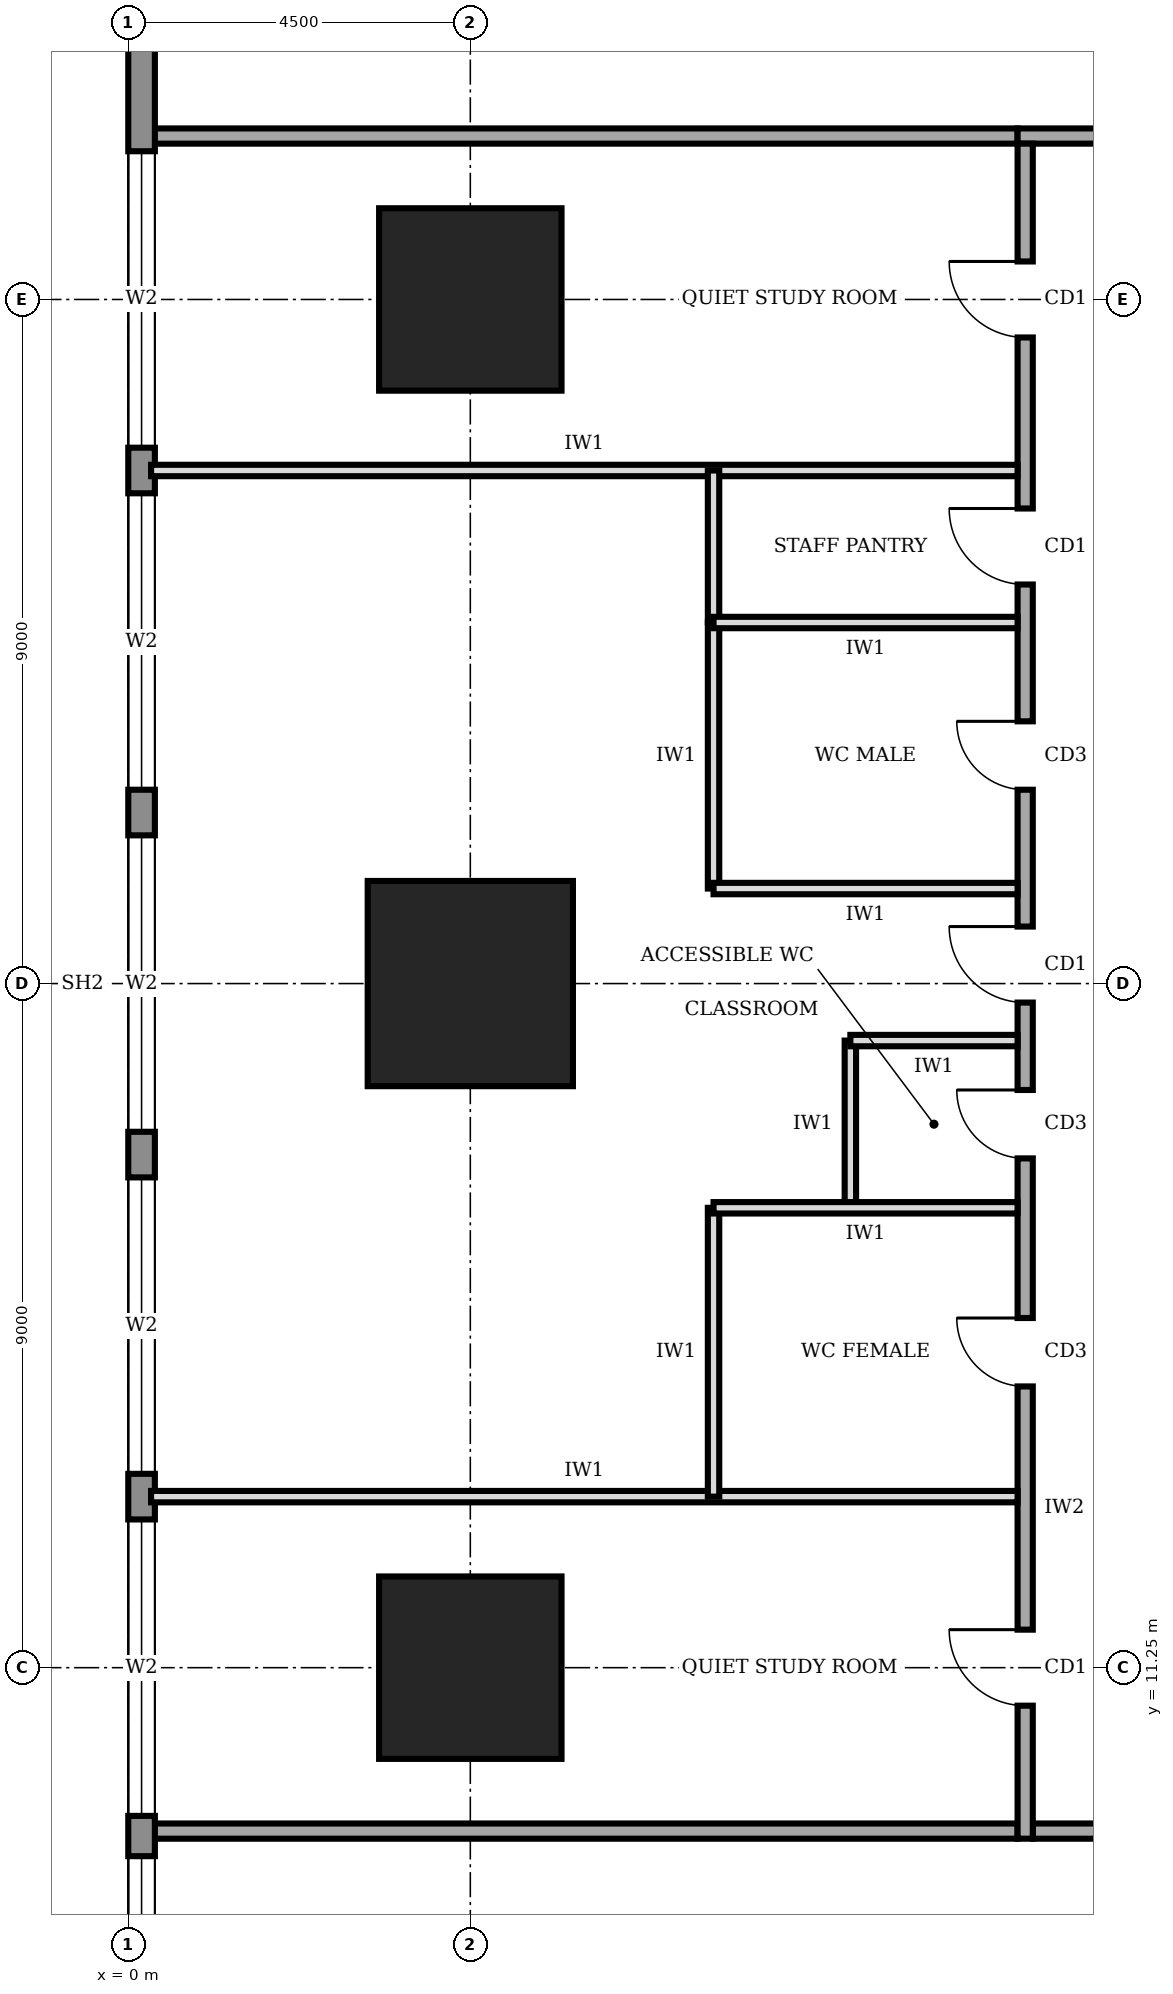
"""IFC4 building model, lengths in metres.
Left out: names, types, materials, properties, quantities, classifications, styles, units other than length and angle.
Written with IfcOpenShell. Run it as: python <this file> out.ifc"""

import sys

from ifc_helpers import new_model, si_unit, direction, frame, frame_2d, origin, origin_2d, place, context, subcontext, project, spatial, rectangle, extrude, element, fill, save


model = new_model("IFC4")
c1 = context("Model", 3, precision=1e-05, world=origin(), true_north=direction((0.0, 1.0)))
c2 = subcontext(c1, "Body", "Model", "MODEL_VIEW")
j1 = project(units=[si_unit("LENGTHUNIT", "METRE"), si_unit("PLANEANGLEUNIT", "RADIAN")], contexts=[c1])
p1 = place(None, origin())
s1 = spatial("IfcSite", under=j1, at=p1, CompositionType="ELEMENT")
p2 = place(p1, origin())
s2 = spatial("IfcBuilding", under=s1, at=p2, CompositionType="ELEMENT")
p3 = place(p2, frame((0.0, 0.0, 65.0)))
s3 = spatial("IfcBuildingStorey", under=s2, at=p3, CompositionType="ELEMENT", Elevation=65.0)
p4 = place(p3, frame((4.5, 11.25, 0.0), z_axis=(0.0, 0.0, 1.0), x_axis=(1.0, 0.0, 0.0)))
e1 = element("IfcColumn", 1, at=p4, inside=s3, PredefinedType="COLUMN", context=c2, shape_type="SweptSolid", body=[
    extrude(rectangle(XDim=2.4, YDim=2.4, at=origin_2d()), origin(), (0.0, 0.0, 1.0), 4.0),
])
p5 = place(p3, frame((4.5, 20.25, 0.0), z_axis=(0.0, 0.0, 1.0), x_axis=(1.0, 0.0, 0.0)))
e2 = element("IfcColumn", 2, at=p5, inside=s3, PredefinedType="COLUMN", context=c2, shape_type="SweptSolid", body=[
    extrude(rectangle(XDim=2.7, YDim=2.7, at=origin_2d()), origin(), (0.0, 0.0, 1.0), 4.0),
])
p6 = place(p3, frame((4.5, 29.25, 0.0), z_axis=(0.0, 0.0, 1.0), x_axis=(1.0, 0.0, 0.0)))
e3 = element("IfcColumn", 3, at=p6, inside=s3, PredefinedType="COLUMN", context=c2, shape_type="SweptSolid", body=[
    extrude(rectangle(XDim=2.4, YDim=2.4, at=origin_2d()), origin(), (0.0, 0.0, 1.0), 4.0),
])
p7 = place(p3, frame((0.175, 35.98, 0.0), z_axis=(0.0, 0.0, 1.0), x_axis=(0.0, -1.0, 0.0)))
e4 = element("IfcWall", 4, at=p7, inside=s3, PredefinedType="STANDARD", context=c2, shape_type="SweptSolid", body=[
    extrude(rectangle(XDim=31.46, YDim=0.35, at=frame_2d((15.73, 0.0))), origin(), (0.0, 0.0, 1.0), 3.75),
])
p8 = place(p7, frame((27.21, 0.0, 0.6)))
e5 = element("IfcOpeningElement", 5, at=p8, cuts=e4, PredefinedType="OPENING", context=c2, shape_type="SweptSolid", body=[
    extrude(rectangle(XDim=3.9, YDim=2.6, at=frame_2d((1.95, 1.3))), frame((0.0, 0.185, 0.0), z_axis=(0.0, -1.0, 0.0), x_axis=(1.0, 0.0, 0.0)), (0.0, 0.0, 1.0), 0.37),
])
p9 = place(p7, frame((22.78, 0.0, 0.6)))
e6 = element("IfcOpeningElement", 6, at=p9, cuts=e4, PredefinedType="OPENING", context=c2, shape_type="SweptSolid", body=[
    extrude(rectangle(XDim=3.9, YDim=2.6, at=frame_2d((1.95, 1.3))), frame((0.0, 0.185, 0.0), z_axis=(0.0, -1.0, 0.0), x_axis=(1.0, 0.0, 0.0)), (0.0, 0.0, 1.0), 0.37),
])
p10 = place(p7, frame((18.28, 0.0, 0.6)))
e7 = element("IfcOpeningElement", 7, at=p10, cuts=e4, PredefinedType="OPENING", context=c2, shape_type="SweptSolid", body=[
    extrude(rectangle(XDim=3.9, YDim=2.6, at=frame_2d((1.95, 1.3))), frame((0.0, 0.185, 0.0), z_axis=(0.0, -1.0, 0.0), x_axis=(1.0, 0.0, 0.0)), (0.0, 0.0, 1.0), 0.37),
])
p11 = place(p7, frame((13.78, 0.0, 0.6)))
e8 = element("IfcOpeningElement", 8, at=p11, cuts=e4, PredefinedType="OPENING", context=c2, shape_type="SweptSolid", body=[
    extrude(rectangle(XDim=3.9, YDim=2.6, at=frame_2d((1.95, 1.3))), frame((0.0, 0.185, 0.0), z_axis=(0.0, -1.0, 0.0), x_axis=(1.0, 0.0, 0.0)), (0.0, 0.0, 1.0), 0.37),
])
p12 = place(p7, frame((9.28, 0.0, 0.6)))
e9 = element("IfcOpeningElement", 9, at=p12, cuts=e4, PredefinedType="OPENING", context=c2, shape_type="SweptSolid", body=[
    extrude(rectangle(XDim=3.9, YDim=2.6, at=frame_2d((1.95, 1.3))), frame((0.0, 0.185, 0.0), z_axis=(0.0, -1.0, 0.0), x_axis=(1.0, 0.0, 0.0)), (0.0, 0.0, 1.0), 0.37),
])
p13 = place(p7, frame((4.78, 0.0, 0.6)))
e10 = element("IfcOpeningElement", 10, at=p13, cuts=e4, PredefinedType="OPENING", context=c2, shape_type="SweptSolid", body=[
    extrude(rectangle(XDim=3.9, YDim=2.6, at=frame_2d((1.95, 1.3))), frame((0.0, 0.185, 0.0), z_axis=(0.0, -1.0, 0.0), x_axis=(1.0, 0.0, 0.0)), (0.0, 0.0, 1.0), 0.37),
])
p14 = place(p3, frame((11.9, 9.1, 0.0), z_axis=(0.0, 0.0, 1.0), x_axis=(1.0, 0.0, 0.0)))
e11 = element("IfcWall", 11, at=p14, inside=s3, PredefinedType="SOLIDWALL", context=c2, shape_type="SweptSolid", body=[
    extrude(rectangle(XDim=18.4, YDim=0.2, at=frame_2d((9.2, 0.0))), origin(), (0.0, 0.0, 1.0), 3.75),
])
p15 = place(p14, frame((2.25, 0.0, 0.0)))
e12 = element("IfcOpeningElement", 12, at=p15, cuts=e11, PredefinedType="OPENING", context=c2, shape_type="SweptSolid", body=[
    extrude(rectangle(XDim=1.4, YDim=2.1, at=frame_2d((0.7, 1.05))), frame((0.0, 0.11, 0.0), z_axis=(0.0, -1.0, 0.0), x_axis=(1.0, 0.0, 0.0)), (0.0, 0.0, 1.0), 0.22),
])
p16 = place(p14, frame((7.85, 0.0, 0.0)))
e13 = element("IfcOpeningElement", 13, at=p16, cuts=e11, PredefinedType="OPENING", context=c2, shape_type="SweptSolid", body=[
    extrude(rectangle(XDim=1.0, YDim=2.1, at=frame_2d((0.5, 1.05))), frame((0.0, 0.11, 0.0), z_axis=(0.0, -1.0, 0.0), x_axis=(1.0, 0.0, 0.0)), (0.0, 0.0, 1.0), 0.22),
])
p17 = place(p14, frame((13.8, 0.0, 0.0)))
e14 = element("IfcOpeningElement", 14, at=p17, cuts=e11, PredefinedType="OPENING", context=c2, shape_type="SweptSolid", body=[
    extrude(rectangle(XDim=1.4, YDim=2.1, at=frame_2d((0.7, 1.05))), frame((0.0, 0.11, 0.0), z_axis=(0.0, -1.0, 0.0), x_axis=(1.0, 0.0, 0.0)), (0.0, 0.0, 1.0), 0.22),
])
p18 = place(p3, frame((30.1, 31.4, 0.0), z_axis=(0.0, 0.0, 1.0), x_axis=(-1.0, 0.0, 0.0)))
e15 = element("IfcWall", 15, at=p18, inside=s3, PredefinedType="SOLIDWALL", context=c2, shape_type="SweptSolid", body=[
    extrude(rectangle(XDim=18.4, YDim=0.2, at=frame_2d((9.2, 0.0))), origin(), (0.0, 0.0, 1.0), 3.75),
])
p19 = place(p18, frame((14.55, 0.0, 0.0)))
e16 = element("IfcOpeningElement", 16, at=p19, cuts=e15, PredefinedType="OPENING", context=c2, shape_type="SweptSolid", body=[
    extrude(rectangle(XDim=1.4, YDim=2.1, at=frame_2d((0.7, 1.05))), frame((0.0, 0.11, 0.0), z_axis=(0.0, -1.0, 0.0), x_axis=(1.0, 0.0, 0.0)), (0.0, 0.0, 1.0), 0.22),
])
p20 = place(p18, frame((7.1, 0.0, 0.0)))
e17 = element("IfcOpeningElement", 17, at=p20, cuts=e15, PredefinedType="OPENING", context=c2, shape_type="SweptSolid", body=[
    extrude(rectangle(XDim=1.0, YDim=2.1, at=frame_2d((0.5, 1.05))), frame((0.0, 0.11, 0.0), z_axis=(0.0, -1.0, 0.0), x_axis=(1.0, 0.0, 0.0)), (0.0, 0.0, 1.0), 0.22),
])
p21 = place(p18, frame((0.55, 0.0, 0.0)))
e18 = element("IfcOpeningElement", 18, at=p21, cuts=e15, PredefinedType="OPENING", context=c2, shape_type="SweptSolid", body=[
    extrude(rectangle(XDim=1.8, YDim=2.1, at=frame_2d((0.9, 1.05))), frame((0.0, 0.11, 0.0), z_axis=(0.0, -1.0, 0.0), x_axis=(1.0, 0.0, 0.0)), (0.0, 0.0, 1.0), 0.22),
])
p22 = place(p3, frame((11.8, 31.3, 0.0), z_axis=(0.0, 0.0, 1.0), x_axis=(0.0, -1.0, 0.0)))
e19 = element("IfcWall", 19, at=p22, inside=s3, PredefinedType="SOLIDWALL", context=c2, shape_type="SweptSolid", body=[
    extrude(rectangle(XDim=22.3, YDim=0.2, at=frame_2d((11.15, 0.0))), origin(), (0.0, 0.0, 1.0), 3.75),
])
p23 = place(p22, frame((19.55, 0.0, 0.0)))
e20 = element("IfcOpeningElement", 20, at=p23, cuts=e19, PredefinedType="OPENING", context=c2, shape_type="SweptSolid", body=[
    extrude(rectangle(XDim=1.0, YDim=2.1, at=frame_2d((0.5, 1.05))), frame((0.0, 0.11, 0.0), z_axis=(0.0, -1.0, 0.0), x_axis=(1.0, 0.0, 0.0)), (0.0, 0.0, 1.0), 0.22),
])
p24 = place(p22, frame((15.45, 0.0, 0.0)))
e21 = element("IfcOpeningElement", 21, at=p24, cuts=e19, PredefinedType="OPENING", context=c2, shape_type="SweptSolid", body=[
    extrude(rectangle(XDim=0.9, YDim=2.1, at=frame_2d((0.45, 1.05))), frame((0.0, 0.11, 0.0), z_axis=(0.0, -1.0, 0.0), x_axis=(1.0, 0.0, 0.0)), (0.0, 0.0, 1.0), 0.22),
])
p25 = place(p22, frame((12.45, 0.0, 0.0)))
e22 = element("IfcOpeningElement", 22, at=p25, cuts=e19, PredefinedType="OPENING", context=c2, shape_type="SweptSolid", body=[
    extrude(rectangle(XDim=0.9, YDim=2.1, at=frame_2d((0.45, 1.05))), frame((0.0, 0.11, 0.0), z_axis=(0.0, -1.0, 0.0), x_axis=(1.0, 0.0, 0.0)), (0.0, 0.0, 1.0), 0.22),
])
p26 = place(p22, frame((7.6, 0.0, 0.0)))
e23 = element("IfcOpeningElement", 23, at=p26, cuts=e19, PredefinedType="OPENING", context=c2, shape_type="SweptSolid", body=[
    extrude(rectangle(XDim=0.9, YDim=2.1, at=frame_2d((0.45, 1.05))), frame((0.0, 0.11, 0.0), z_axis=(0.0, -1.0, 0.0), x_axis=(1.0, 0.0, 0.0)), (0.0, 0.0, 1.0), 0.22),
])
p27 = place(p22, frame((4.8, 0.0, 0.0)))
e24 = element("IfcOpeningElement", 24, at=p27, cuts=e19, PredefinedType="OPENING", context=c2, shape_type="SweptSolid", body=[
    extrude(rectangle(XDim=1.0, YDim=2.1, at=frame_2d((0.5, 1.05))), frame((0.0, 0.11, 0.0), z_axis=(0.0, -1.0, 0.0), x_axis=(1.0, 0.0, 0.0)), (0.0, 0.0, 1.0), 0.22),
])
p28 = place(p22, frame((10.3, 0.0, 0.0)))
e25 = element("IfcOpeningElement", 25, at=p28, cuts=e19, PredefinedType="OPENING", context=c2, shape_type="SweptSolid", body=[
    extrude(rectangle(XDim=1.0, YDim=2.1, at=frame_2d((0.5, 1.05))), frame((0.0, 0.11, 0.0), z_axis=(0.0, -1.0, 0.0), x_axis=(1.0, 0.0, 0.0)), (0.0, 0.0, 1.0), 0.22),
])
p29 = place(p22, frame((1.55, 0.0, 0.0)))
e26 = element("IfcOpeningElement", 26, at=p29, cuts=e19, PredefinedType="OPENING", context=c2, shape_type="SweptSolid", body=[
    extrude(rectangle(XDim=1.0, YDim=2.1, at=frame_2d((0.5, 1.05))), frame((0.0, 0.11, 0.0), z_axis=(0.0, -1.0, 0.0), x_axis=(1.0, 0.0, 0.0)), (0.0, 0.0, 1.0), 0.22),
])
for number, where, z_axis, x_axis in (
    (27, (0.3, 9.1, 0.0), (0.0, 0.0, 1.0), (1.0, 0.0, 0.0)),
    (28, (0.3, 31.4, 0.0), (0.0, 0.0, 1.0), (1.0, 0.0, 0.0)),
):
    element("IfcWall", number, at=place(p3, frame(where, z_axis=z_axis, x_axis=x_axis)), inside=s3, PredefinedType="SOLIDWALL", context=c2, shape_type="SweptSolid", body=[
        extrude(rectangle(XDim=11.4, YDim=0.2, at=frame_2d((5.7, 0.0))), origin(), (0.0, 0.0, 1.0), 3.75),
    ])
for number, where, z_axis, x_axis in (
    (29, (0.3, 13.5, 0.0), (0.0, 0.0, 1.0), (1.0, 0.0, 0.0)),
    (30, (0.3, 27.0, 0.0), (0.0, 0.0, 1.0), (1.0, 0.0, 0.0)),
):
    element("IfcWall", number, at=place(p3, frame(where, z_axis=z_axis, x_axis=x_axis)), inside=s3, PredefinedType="PARTITIONING", context=c2, shape_type="SweptSolid", body=[
        extrude(rectangle(XDim=11.4, YDim=0.15, at=frame_2d((5.7, 0.0))), origin(), (0.0, 0.0, 1.0), 3.75),
    ])
p30 = place(p3, frame((11.7, 17.3, 0.0), z_axis=(0.0, 0.0, 1.0), x_axis=(-1.0, 0.0, 0.0)))
e31 = element("IfcWall", 31, at=p30, inside=s3, PredefinedType="PARTITIONING", context=c2, shape_type="SweptSolid", body=[
    extrude(rectangle(XDim=4.0, YDim=0.15, at=frame_2d((2.0, 0.0))), origin(), (0.0, 0.0, 1.0), 3.75),
])
p31 = place(p3, frame((11.7, 19.5, 0.0), z_axis=(0.0, 0.0, 1.0), x_axis=(-1.0, 0.0, 0.0)))
e32 = element("IfcWall", 32, at=p31, inside=s3, PredefinedType="PARTITIONING", context=c2, shape_type="SweptSolid", body=[
    extrude(rectangle(XDim=2.2, YDim=0.15, at=frame_2d((1.1, 0.0))), origin(), (0.0, 0.0, 1.0), 2.85),
])
for number, where, z_axis, x_axis in (
    (33, (11.7, 21.5, 0.0), (0.0, 0.0, 1.0), (-1.0, 0.0, 0.0)),
    (34, (11.7, 25.0, 0.0), (0.0, 0.0, 1.0), (-1.0, 0.0, 0.0)),
):
    element("IfcWall", number, at=place(p3, frame(where, z_axis=z_axis, x_axis=x_axis)), inside=s3, PredefinedType="PARTITIONING", context=c2, shape_type="SweptSolid", body=[
        extrude(rectangle(XDim=4.0, YDim=0.15, at=frame_2d((2.0, 0.0))), origin(), (0.0, 0.0, 1.0), 3.75),
    ])
p32 = place(p3, frame((7.7, 13.5, 0.0), z_axis=(0.0, 0.0, 1.0), x_axis=(0.0, 1.0, 0.0)))
e35 = element("IfcWall", 35, at=p32, inside=s3, PredefinedType="PARTITIONING", context=c2, shape_type="SweptSolid", body=[
    extrude(rectangle(XDim=3.8, YDim=0.15, at=frame_2d((1.9, 0.0))), origin(), (0.0, 0.0, 1.0), 3.75),
])
p33 = place(p3, frame((9.5, 17.3, 0.0), z_axis=(0.0, 0.0, 1.0), x_axis=(0.0, 1.0, 0.0)))
e36 = element("IfcWall", 36, at=p33, inside=s3, PredefinedType="PARTITIONING", context=c2, shape_type="SweptSolid", body=[
    extrude(rectangle(XDim=2.2, YDim=0.15, at=frame_2d((1.1, 0.0))), origin(), (0.0, 0.0, 1.0), 3.75),
])
p34 = place(p3, frame((7.7, 21.5, 0.0), z_axis=(0.0, 0.0, 1.0), x_axis=(0.0, 1.0, 0.0)))
e37 = element("IfcWall", 37, at=p34, inside=s3, PredefinedType="PARTITIONING", context=c2, shape_type="SweptSolid", body=[
    extrude(rectangle(XDim=3.5, YDim=0.15, at=frame_2d((1.75, 0.0))), origin(), (0.0, 0.0, 1.0), 3.75),
])
p35 = place(p3, frame((7.7, 25.0, 0.0), z_axis=(0.0, 0.0, 1.0), x_axis=(0.0, 1.0, 0.0)))
e38 = element("IfcWall", 38, at=p35, inside=s3, PredefinedType="PARTITIONING", context=c2, shape_type="SweptSolid", body=[
    extrude(rectangle(XDim=2.0, YDim=0.15, at=frame_2d((1.0, 0.0))), origin(), (0.0, 0.0, 1.0), 3.75),
])
p36 = place(p8, origin())
e39 = element("IfcWindow", 39, at=p36, inside=s3, PartitioningType="SINGLE_PANEL", PredefinedType="WINDOW", context=c2, shape_type="SweptSolid", body=[
    extrude(rectangle(XDim=3.9, YDim=2.6, at=frame_2d((1.95, 1.3))), frame((0.0, 0.03, 0.0), z_axis=(0.0, -1.0, 0.0), x_axis=(1.0, 0.0, 0.0)), (0.0, 0.0, 1.0), 0.06),
])
fill(e5, e39)
p37 = place(p9, origin())
e40 = element("IfcWindow", 40, at=p37, inside=s3, PartitioningType="SINGLE_PANEL", PredefinedType="WINDOW", context=c2, shape_type="SweptSolid", body=[
    extrude(rectangle(XDim=3.9, YDim=2.6, at=frame_2d((1.95, 1.3))), frame((0.0, 0.03, 0.0), z_axis=(0.0, -1.0, 0.0), x_axis=(1.0, 0.0, 0.0)), (0.0, 0.0, 1.0), 0.06),
])
fill(e6, e40)
p38 = place(p10, origin())
e41 = element("IfcWindow", 41, at=p38, inside=s3, PartitioningType="SINGLE_PANEL", PredefinedType="WINDOW", context=c2, shape_type="SweptSolid", body=[
    extrude(rectangle(XDim=3.9, YDim=2.6, at=frame_2d((1.95, 1.3))), frame((0.0, 0.03, 0.0), z_axis=(0.0, -1.0, 0.0), x_axis=(1.0, 0.0, 0.0)), (0.0, 0.0, 1.0), 0.06),
])
fill(e7, e41)
p39 = place(p11, origin())
e42 = element("IfcWindow", 42, at=p39, inside=s3, PartitioningType="SINGLE_PANEL", PredefinedType="WINDOW", context=c2, shape_type="SweptSolid", body=[
    extrude(rectangle(XDim=3.9, YDim=2.6, at=frame_2d((1.95, 1.3))), frame((0.0, 0.03, 0.0), z_axis=(0.0, -1.0, 0.0), x_axis=(1.0, 0.0, 0.0)), (0.0, 0.0, 1.0), 0.06),
])
fill(e8, e42)
p40 = place(p12, origin())
e43 = element("IfcWindow", 43, at=p40, inside=s3, PartitioningType="SINGLE_PANEL", PredefinedType="WINDOW", context=c2, shape_type="SweptSolid", body=[
    extrude(rectangle(XDim=3.9, YDim=2.6, at=frame_2d((1.95, 1.3))), frame((0.0, 0.03, 0.0), z_axis=(0.0, -1.0, 0.0), x_axis=(1.0, 0.0, 0.0)), (0.0, 0.0, 1.0), 0.06),
])
fill(e9, e43)
p41 = place(p13, origin())
e44 = element("IfcWindow", 44, at=p41, inside=s3, PartitioningType="SINGLE_PANEL", PredefinedType="WINDOW", context=c2, shape_type="SweptSolid", body=[
    extrude(rectangle(XDim=3.9, YDim=2.6, at=frame_2d((1.95, 1.3))), frame((0.0, 0.03, 0.0), z_axis=(0.0, -1.0, 0.0), x_axis=(1.0, 0.0, 0.0)), (0.0, 0.0, 1.0), 0.06),
])
fill(e10, e44)
p42 = place(p23, frame((1.0, 0.0, 0.0), z_axis=(0.0, 0.0, 1.0), x_axis=(-1.0, 0.0, 0.0)))
e45 = element("IfcDoor", 45, at=p42, inside=s3, OperationType="SINGLE_SWING_RIGHT", PredefinedType="DOOR", context=c2, shape_type="SweptSolid", body=[
    extrude(rectangle(XDim=1.0, YDim=2.1, at=frame_2d((0.5, 1.05))), frame((0.0, 0.025, 0.0), z_axis=(0.0, -1.0, 0.0), x_axis=(1.0, 0.0, 0.0)), (0.0, 0.0, 1.0), 0.05),
])
fill(e20, e45)
p43 = place(p24, frame((0.9, 0.0, 0.0), z_axis=(0.0, 0.0, 1.0), x_axis=(-1.0, 0.0, 0.0)))
e46 = element("IfcDoor", 46, at=p43, inside=s3, OperationType="SINGLE_SWING_RIGHT", PredefinedType="DOOR", context=c2, shape_type="SweptSolid", body=[
    extrude(rectangle(XDim=0.9, YDim=2.1, at=frame_2d((0.45, 1.05))), frame((0.0, 0.025, 0.0), z_axis=(0.0, -1.0, 0.0), x_axis=(1.0, 0.0, 0.0)), (0.0, 0.0, 1.0), 0.05),
])
fill(e21, e46)
p44 = place(p25, frame((0.9, 0.0, 0.0), z_axis=(0.0, 0.0, 1.0), x_axis=(-1.0, 0.0, 0.0)))
e47 = element("IfcDoor", 47, at=p44, inside=s3, OperationType="SINGLE_SWING_RIGHT", PredefinedType="DOOR", context=c2, shape_type="SweptSolid", body=[
    extrude(rectangle(XDim=0.9, YDim=2.1, at=frame_2d((0.45, 1.05))), frame((0.0, 0.025, 0.0), z_axis=(0.0, -1.0, 0.0), x_axis=(1.0, 0.0, 0.0)), (0.0, 0.0, 1.0), 0.05),
])
fill(e22, e47)
p45 = place(p26, frame((0.9, 0.0, 0.0), z_axis=(0.0, 0.0, 1.0), x_axis=(-1.0, 0.0, 0.0)))
e48 = element("IfcDoor", 48, at=p45, inside=s3, OperationType="SINGLE_SWING_RIGHT", PredefinedType="DOOR", context=c2, shape_type="SweptSolid", body=[
    extrude(rectangle(XDim=0.9, YDim=2.1, at=frame_2d((0.45, 1.05))), frame((0.0, 0.025, 0.0), z_axis=(0.0, -1.0, 0.0), x_axis=(1.0, 0.0, 0.0)), (0.0, 0.0, 1.0), 0.05),
])
fill(e23, e48)
p46 = place(p27, frame((1.0, 0.0, 0.0), z_axis=(0.0, 0.0, 1.0), x_axis=(-1.0, 0.0, 0.0)))
e49 = element("IfcDoor", 49, at=p46, inside=s3, OperationType="SINGLE_SWING_RIGHT", PredefinedType="DOOR", context=c2, shape_type="SweptSolid", body=[
    extrude(rectangle(XDim=1.0, YDim=2.1, at=frame_2d((0.5, 1.05))), frame((0.0, 0.025, 0.0), z_axis=(0.0, -1.0, 0.0), x_axis=(1.0, 0.0, 0.0)), (0.0, 0.0, 1.0), 0.05),
])
fill(e24, e49)
p47 = place(p28, frame((1.0, 0.0, 0.0), z_axis=(0.0, 0.0, 1.0), x_axis=(-1.0, 0.0, 0.0)))
e50 = element("IfcDoor", 50, at=p47, inside=s3, OperationType="SINGLE_SWING_RIGHT", PredefinedType="DOOR", context=c2, shape_type="SweptSolid", body=[
    extrude(rectangle(XDim=1.0, YDim=2.1, at=frame_2d((0.5, 1.05))), frame((0.0, 0.025, 0.0), z_axis=(0.0, -1.0, 0.0), x_axis=(1.0, 0.0, 0.0)), (0.0, 0.0, 1.0), 0.05),
])
fill(e25, e50)
p48 = place(p29, frame((1.0, 0.0, 0.0), z_axis=(0.0, 0.0, 1.0), x_axis=(-1.0, 0.0, 0.0)))
e51 = element("IfcDoor", 51, at=p48, inside=s3, OperationType="SINGLE_SWING_RIGHT", PredefinedType="DOOR", context=c2, shape_type="SweptSolid", body=[
    extrude(rectangle(XDim=1.0, YDim=2.1, at=frame_2d((0.5, 1.05))), frame((0.0, 0.025, 0.0), z_axis=(0.0, -1.0, 0.0), x_axis=(1.0, 0.0, 0.0)), (0.0, 0.0, 1.0), 0.05),
])
fill(e26, e51)
save(model, sys.argv[1])
